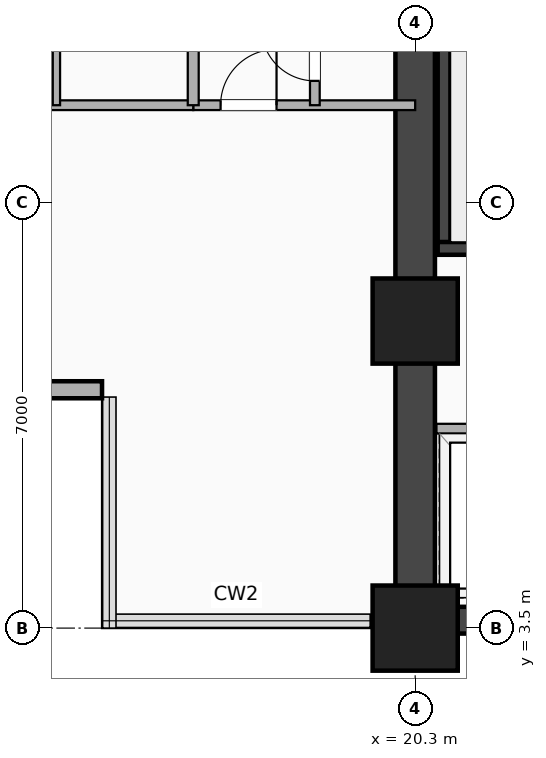
"""IFC4 building model, lengths in metres.
Left out: names, types, materials, properties, quantities, classifications, styles, units other than length and angle.
Written with IfcOpenShell. Run it as: python <this file> out.ifc"""

import sys

from ifc_helpers import new_model, si_unit, direction, frame, frame_2d, origin, origin_2d, place, context, subcontext, project, spatial, rectangle, extrude, element, fill, save


model = new_model("IFC4")
c1 = context("Model", 3, precision=1e-05, world=origin(), true_north=direction((0.0, 1.0)))
c2 = subcontext(c1, "Body", "Model", "MODEL_VIEW")
j1 = project(units=[si_unit("LENGTHUNIT", "METRE"), si_unit("PLANEANGLEUNIT", "RADIAN")], contexts=[c1])
p1 = place(None, origin())
s1 = spatial("IfcSite", under=j1, at=p1, CompositionType="ELEMENT")
p2 = place(p1, origin())
s2 = spatial("IfcBuilding", under=s1, at=p2, CompositionType="ELEMENT")
p3 = place(p2, frame((0.0, 0.0, 71.9)))
s3 = spatial("IfcBuildingStorey", under=s2, at=p3, CompositionType="ELEMENT", Elevation=71.9)
p4 = place(p3, frame((20.3, 3.63, 0.0), z_axis=(0.0, 0.0, 1.0), x_axis=(1.0, 0.0, 0.0)))
e1 = element("IfcWall", 1, at=p4, inside=s3, PredefinedType="SHEAR", context=c2, shape_type="SweptSolid", body=[
    extrude(rectangle(XDim=24.5, YDim=0.44, at=frame_2d((12.25, 0.0))), origin(), (0.0, 0.0, 1.0), 3.18),
])
p5 = place(p3, frame((20.3, 3.5, 0.0), z_axis=(0.0, 0.0, 1.0), x_axis=(0.0, 1.0, 0.0)))
e2 = element("IfcWall", 2, at=p5, inside=s3, PredefinedType="SHEAR", context=c2, shape_type="SweptSolid", body=[
    extrude(rectangle(XDim=16.9, YDim=0.65, at=frame_2d((8.45, 0.0))), origin(), (0.0, 0.0, 1.0), 3.18),
])
p6 = place(p3, frame((20.775, 9.745, 0.0), z_axis=(0.0, 0.0, 1.0), x_axis=(0.0, 1.0, 0.0)))
e3 = element("IfcWall", 3, at=p6, inside=s3, PredefinedType="SHEAR", context=c2, shape_type="SweptSolid", body=[
    extrude(rectangle(XDim=8.01, YDim=0.21, at=frame_2d((4.005, 0.0))), origin(), (0.0, 0.0, 1.0), 3.18),
])
p7 = place(p3, frame((20.67, 9.745, 0.0), z_axis=(0.0, 0.0, 1.0), x_axis=(1.0, 0.0, 0.0)))
e4 = element("IfcWall", 4, at=p7, inside=s3, PredefinedType="SHEAR", context=c2, shape_type="SweptSolid", body=[
    extrude(rectangle(XDim=3.66, YDim=0.21, at=frame_2d((1.83, 0.0))), origin(), (0.0, 0.0, 1.0), 3.18),
])
for number, where, z_axis, x_axis in (
    (5, (20.3, 3.5, -0.28), (0.0, 0.0, 1.0), (1.0, 0.0, 0.0)),
    (6, (20.3, 8.55, -0.28), (0.0, 0.0, 1.0), (1.0, 0.0, 0.0)),
):
    element("IfcColumn", number, at=place(p3, frame(where, z_axis=z_axis, x_axis=x_axis)), inside=s3, PredefinedType="COLUMN", context=c2, shape_type="SweptSolid", body=[
        extrude(rectangle(XDim=1.4, YDim=1.4, at=origin_2d()), origin(), (0.0, 0.0, 1.0), 3.46),
    ])
p8 = place(p3, frame((11.35, 7.42, 0.0), z_axis=(0.0, 0.0, 1.0), x_axis=(1.0, 0.0, 0.0)))
e7 = element("IfcWall", 7, at=p8, inside=s3, PredefinedType="SOLIDWALL", context=c2, shape_type="SweptSolid", body=[
    extrude(rectangle(XDim=3.8, YDim=0.28, at=frame_2d((1.9, 0.0))), origin(), (0.0, 0.0, 1.0), 3.18),
])
p9 = place(p8, frame((1.025, 0.0, 0.85)))
e8 = element("IfcOpeningElement", 8, at=p9, cuts=e7, PredefinedType="OPENING", context=c2, shape_type="SweptSolid", body=[
    extrude(rectangle(XDim=1.75, YDim=1.65, at=frame_2d((0.875, 0.825))), frame((0.0, 0.15, 0.0), z_axis=(0.0, -1.0, 0.0), x_axis=(1.0, 0.0, 0.0)), (0.0, 0.0, 1.0), 0.3),
])
p10 = place(p3, frame((20.65, 6.78, 0.0), z_axis=(0.0, 0.0, 1.0), x_axis=(1.0, 0.0, 0.0)))
e9 = element("IfcWall", 9, at=p10, inside=s3, PredefinedType="PARTITIONING", context=c2, shape_type="SweptSolid", body=[
    extrude(rectangle(XDim=8.3, YDim=0.16, at=frame_2d((4.15, 0.0))), origin(), (0.0, 0.0, 1.0), 2.47),
])
p11 = place(p10, frame((3.695, 0.0, 0.0)))
e10 = element("IfcOpeningElement", 10, at=p11, cuts=e9, PredefinedType="OPENING", context=c2, shape_type="SweptSolid", body=[
    extrude(rectangle(XDim=1.15, YDim=2.2, at=frame_2d((0.575, 1.1))), frame((0.0, 0.09, 0.0), z_axis=(0.0, -1.0, 0.0), x_axis=(1.0, 0.0, 0.0)), (0.0, 0.0, 1.0), 0.18),
])
p12 = place(p10, frame((5.492, 0.0, 0.0)))
e11 = element("IfcOpeningElement", 11, at=p12, cuts=e9, PredefinedType="OPENING", context=c2, shape_type="SweptSolid", body=[
    extrude(rectangle(XDim=1.15, YDim=2.2, at=frame_2d((0.575, 1.1))), frame((0.0, 0.09, 0.0), z_axis=(0.0, -1.0, 0.0), x_axis=(1.0, 0.0, 0.0)), (0.0, 0.0, 1.0), 0.18),
])
p13 = place(p10, frame((1.059, 0.0, 0.0)))
e12 = element("IfcOpeningElement", 12, at=p13, cuts=e9, PredefinedType="OPENING", context=c2, shape_type="SweptSolid", body=[
    extrude(rectangle(XDim=1.15, YDim=2.2, at=frame_2d((0.575, 1.1))), frame((0.0, 0.09, 0.0), z_axis=(0.0, -1.0, 0.0), x_axis=(1.0, 0.0, 0.0)), (0.0, 0.0, 1.0), 0.18),
])
p14 = place(p3, frame((16.65, 12.1, 0.0), z_axis=(0.0, 0.0, 1.0), x_axis=(1.0, 0.0, 0.0)))
e13 = element("IfcWall", 13, at=p14, inside=s3, PredefinedType="PARTITIONING", context=c2, shape_type="SweptSolid", body=[
    extrude(rectangle(XDim=3.65, YDim=0.16, at=frame_2d((1.825, 0.0))), origin(), (0.0, 0.0, 1.0), 2.47),
])
p15 = place(p14, frame((1.37, 0.0, 0.0), z_axis=(0.0, 0.0, 1.0), x_axis=(-1.0, 0.0, 0.0)))
e14 = element("IfcOpeningElement", 14, at=p15, cuts=e13, PredefinedType="OPENING", context=c2, shape_type="SweptSolid", body=[
    extrude(rectangle(XDim=0.92, YDim=2.08, at=frame_2d((0.46, 1.04))), frame((0.0, 0.09, 0.0), z_axis=(0.0, -1.0, 0.0), x_axis=(1.0, 0.0, 0.0)), (0.0, 0.0, 1.0), 0.18),
])
p16 = place(p3, frame((18.65, 12.1, 0.0), z_axis=(0.0, 0.0, 1.0), x_axis=(0.0, 1.0, 0.0)))
e15 = element("IfcWall", 15, at=p16, inside=s3, PredefinedType="PARTITIONING", context=c2, shape_type="SweptSolid", body=[
    extrude(rectangle(XDim=8.32, YDim=0.16, at=frame_2d((4.16, 0.0))), origin(), (0.0, 0.0, 1.0), 2.47),
])
p17 = place(p16, frame((1.28, 0.0, 0.0), z_axis=(0.0, 0.0, 1.0), x_axis=(-1.0, 0.0, 0.0)))
e16 = element("IfcOpeningElement", 16, at=p17, cuts=e15, PredefinedType="OPENING", context=c2, shape_type="SweptSolid", body=[
    extrude(rectangle(XDim=0.88, YDim=2.08, at=frame_2d((0.44, 1.04))), frame((0.0, 0.09, 0.0), z_axis=(0.0, -1.0, 0.0), x_axis=(1.0, 0.0, 0.0)), (0.0, 0.0, 1.0), 0.18),
])
p18 = place(p3, frame((11.47, 12.1, 0.0), z_axis=(0.0, 0.0, 1.0), x_axis=(1.0, 0.0, 0.0)))
e17 = element("IfcWall", 17, at=p18, inside=s3, PredefinedType="PARTITIONING", context=c2, shape_type="SweptSolid", body=[
    extrude(rectangle(XDim=5.18, YDim=0.16, at=frame_2d((2.59, 0.0))), origin(), (0.0, 0.0, 1.0), 2.543),
])
p19 = place(p3, frame((14.4, 12.1, 0.0), z_axis=(0.0, 0.0, 1.0), x_axis=(0.0, 1.0, 0.0)))
e18 = element("IfcWall", 18, at=p19, inside=s3, PredefinedType="PARTITIONING", context=c2, shape_type="SweptSolid", body=[
    extrude(rectangle(XDim=2.15, YDim=0.12, at=frame_2d((1.075, 0.0))), origin(), (0.0, 0.0, 1.0), 2.862),
])
p20 = place(p3, frame((16.65, 12.1, 0.0), z_axis=(0.0, 0.0, 1.0), x_axis=(0.0, 1.0, 0.0)))
e19 = element("IfcWall", 19, at=p20, inside=s3, PredefinedType="PARTITIONING", context=c2, shape_type="SweptSolid", body=[
    extrude(rectangle(XDim=2.15, YDim=0.18, at=frame_2d((1.075, 0.0))), origin(), (0.0, 0.0, 1.0), 2.862),
])
p21 = place(p15, origin())
e20 = element("IfcDoor", 20, at=p21, inside=s3, OperationType="SINGLE_SWING_RIGHT", PredefinedType="DOOR", context=c2, shape_type="SweptSolid", body=[
    extrude(rectangle(XDim=0.92, YDim=2.08, at=frame_2d((0.46, 1.04))), frame((0.0, 0.025, 0.0), z_axis=(0.0, -1.0, 0.0), x_axis=(1.0, 0.0, 0.0)), (0.0, 0.0, 1.0), 0.05),
])
fill(e14, e20)
p22 = place(p17, origin())
e21 = element("IfcDoor", 21, at=p22, inside=s3, OperationType="SINGLE_SWING_RIGHT", PredefinedType="DOOR", context=c2, shape_type="SweptSolid", body=[
    extrude(rectangle(XDim=0.88, YDim=2.08, at=frame_2d((0.44, 1.04))), frame((0.0, 0.025, 0.0), z_axis=(0.0, -1.0, 0.0), x_axis=(1.0, 0.0, 0.0)), (0.0, 0.0, 1.0), 0.05),
])
fill(e16, e21)
save(model, sys.argv[1])
